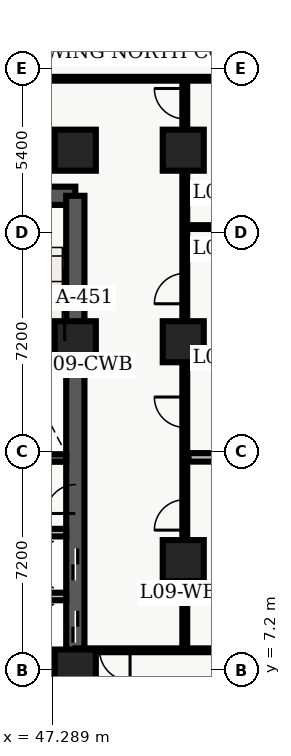
"""IFC4 building model, lengths in metres.
Left out: names, types, materials, properties, quantities, classifications, styles, units other than length and angle.
Written with IfcOpenShell. Run it as: python <this file> out.ifc"""

import sys

from ifc_helpers import new_model, entity, si_unit, converted_unit, direction, frame, origin_with_axes, origin_2d_with_axis, place, context, subcontext, project, spatial, polyline, rectangle, outline, extrude, element, fill, save


model = new_model("IFC4")
c1 = context("Model", 3, precision=1e-05, world=origin_with_axes(), true_north=direction((0.0, 1.0)))
c2 = subcontext(c1, "Body", "Model", "MODEL_VIEW")
j1 = project(units=[si_unit("LENGTHUNIT", "METRE"), converted_unit("PLANEANGLEUNIT", "DEGREE", entity("IfcPlaneAngleMeasure", 0.017), si_unit("PLANEANGLEUNIT", "RADIAN"), dimensions=[0, 0, 0, 0, 0, 0, 0])], contexts=[c1])
p1 = place(None, origin_with_axes())
s1 = spatial("IfcSite", under=j1, at=p1, CompositionType="ELEMENT")
p2 = place(p1, origin_with_axes())
s2 = spatial("IfcBuilding", under=s1, at=p2, CompositionType="ELEMENT")
p3 = place(p2, frame((0.0, 0.0, 40.5), z_axis=(0.0, 0.0, 1.0), x_axis=(1.0, 0.0, 0.0)))
s3 = spatial("IfcBuildingStorey", under=s2, at=p3, CompositionType="ELEMENT", Elevation=40.5)
p4 = place(p3, frame((40.2, 7.2, 0.0), z_axis=(0.0, 0.0, 1.0), x_axis=(1.0, 0.0, 0.0)))
e1 = element("IfcWall", 1, at=p4, inside=s3, PredefinedType="SHEAR", context=c2, shape_type="SweptSolid", body=[
    extrude(outline(polyline([(0.0, -0.3), (7.85, -0.3), (7.85, 0.3), (0.0, 0.3), (0.0, -0.3)])), origin_with_axes(), (0.0, 0.0, 1.0), 3.66),
])
p5 = place(p4, frame((2.175, 0.0, 0.0), z_axis=(0.0, 0.0, 1.0), x_axis=(1.0, 0.0, 0.0)))
e2 = element("IfcOpeningElement", 2, at=p5, cuts=e1, PredefinedType="OPENING", context=c2, shape_type="SweptSolid", body=[
    extrude(rectangle(XDim=1.05, YDim=0.62, at=origin_2d_with_axis()), origin_with_axes(), (0.0, 0.0, 1.0), 2.15),
])
p6 = place(p3, frame((40.2, 22.8, 0.0), z_axis=(0.0, 0.0, 1.0), x_axis=(1.0, 0.0, 0.0)))
e3 = element("IfcWall", 3, at=p6, inside=s3, PredefinedType="SHEAR", context=c2, shape_type="SweptSolid", body=[
    extrude(outline(polyline([(0.0, -0.3), (7.85, -0.3), (7.85, 0.3), (0.0, 0.3), (0.0, -0.3)])), origin_with_axes(), (0.0, 0.0, 1.0), 3.66),
])
p7 = place(p6, frame((5.775, 0.0, 0.0), z_axis=(0.0, 0.0, 1.0), x_axis=(1.0, 0.0, 0.0)))
e4 = element("IfcOpeningElement", 4, at=p7, cuts=e3, PredefinedType="OPENING", context=c2, shape_type="SweptSolid", body=[
    extrude(rectangle(XDim=1.05, YDim=0.62, at=origin_2d_with_axis()), origin_with_axes(), (0.0, 0.0, 1.0), 2.15),
])
p8 = place(p6, frame((2.15, 0.0, 0.0), z_axis=(0.0, 0.0, 1.0), x_axis=(1.0, 0.0, 0.0)))
e5 = element("IfcOpeningElement", 5, at=p8, cuts=e3, PredefinedType="OPENING", context=c2, shape_type="SweptSolid", body=[
    extrude(rectangle(XDim=0.9, YDim=0.62, at=origin_2d_with_axis()), origin_with_axes(), (0.0, 0.0, 1.0), 2.15),
])
p9 = place(p3, frame((48.05, 7.2, 0.0), z_axis=(0.0, 0.0, 1.0), x_axis=(0.0, 1.0, 0.0)))
e6 = element("IfcWall", 6, at=p9, inside=s3, PredefinedType="SHEAR", context=c2, shape_type="SweptSolid", body=[
    extrude(outline(polyline([(0.0, -0.3), (15.6, -0.3), (15.6, 0.3), (0.0, 0.3), (0.0, -0.3)])), origin_with_axes(), (0.0, 0.0, 1.0), 3.66),
])
p10 = place(p9, frame((1.425, 0.0, 0.0), z_axis=(0.0, 0.0, 1.0), x_axis=(1.0, 0.0, 0.0)))
e7 = element("IfcOpeningElement", 7, at=p10, cuts=e6, PredefinedType="OPENING", context=c2, shape_type="SweptSolid", body=[
    extrude(rectangle(XDim=1.05, YDim=0.62, at=origin_2d_with_axis()), origin_with_axes(), (0.0, 0.0, 1.0), 2.15),
])
p11 = place(p9, frame((3.475, 0.0, 0.0), z_axis=(0.0, 0.0, 1.0), x_axis=(1.0, 0.0, 0.0)))
e8 = element("IfcOpeningElement", 8, at=p11, cuts=e6, PredefinedType="OPENING", context=c2, shape_type="SweptSolid", body=[
    extrude(rectangle(XDim=1.05, YDim=0.62, at=origin_2d_with_axis()), origin_with_axes(), (0.0, 0.0, 1.0), 2.15),
])
p12 = place(p9, frame((5.625, 0.0, 0.0), z_axis=(0.0, 0.0, 1.0), x_axis=(1.0, 0.0, 0.0)))
e9 = element("IfcOpeningElement", 9, at=p12, cuts=e6, PredefinedType="OPENING", context=c2, shape_type="SweptSolid", body=[
    extrude(rectangle(XDim=0.95, YDim=0.62, at=origin_2d_with_axis()), origin_with_axes(), (0.0, 0.0, 1.0), 2.15),
])
p13 = place(p3, frame((44.25, 14.175, 0.0), z_axis=(0.0, 0.0, 1.0), x_axis=(1.0, 0.0, 0.0)))
e10 = element("IfcWall", 10, at=p13, inside=s3, PredefinedType="SHEAR", context=c2, shape_type="SweptSolid", body=[
    extrude(outline(polyline([(0.0, -0.125), (3.5, -0.125), (3.5, 0.125), (0.0, 0.125), (0.0, -0.125)])), origin_with_axes(), (0.0, 0.0, 1.0), 3.66),
])
for number, where, z_axis, x_axis in (
    (11, (48.05, 7.2, 0.0), (0.0, 0.0, 1.0), (1.0, 0.0, 0.0)),
    (12, (48.05, 18.0, 0.0), (0.0, 0.0, 1.0), (1.0, 0.0, 0.0)),
    (13, (48.05, 24.3, 0.0), (0.0, 0.0, 1.0), (1.0, 0.0, 0.0)),
    (14, (51.6, 10.8, 0.0), (0.0, 0.0, 1.0), (1.0, 0.0, 0.0)),
    (15, (51.6, 18.0, 0.0), (0.0, 0.0, 1.0), (1.0, 0.0, 0.0)),
    (16, (51.6, 24.3, 0.0), (0.0, 0.0, 1.0), (1.0, 0.0, 0.0)),
):
    element("IfcColumn", number, at=place(p3, frame(where, z_axis=z_axis, x_axis=x_axis)), inside=s3, PredefinedType="COLUMN", context=c2, shape_type="SweptSolid", body=[
        extrude(rectangle(XDim=1.35, YDim=1.35, at=origin_2d_with_axis()), origin_with_axes(), (0.0, 0.0, 1.0), 3.9),
    ])
for number, where, z_axis, x_axis in (
    (17, (44.25, 9.62, 0.0), (0.0, 0.0, 1.0), (1.0, 0.0, 0.0)),
    (18, (44.25, 11.72, 0.0), (0.0, 0.0, 1.0), (1.0, 0.0, 0.0)),
):
    element("IfcWall", number, at=place(p3, frame(where, z_axis=z_axis, x_axis=x_axis)), inside=s3, PredefinedType="SOLIDWALL", context=c2, shape_type="SweptSolid", body=[
        extrude(outline(polyline([(0.0, -0.125), (3.5, -0.125), (3.5, 0.125), (0.0, 0.125), (0.0, -0.125)])), origin_with_axes(), (0.0, 0.0, 1.0), 2.7),
    ])
p14 = place(p3, frame((51.65, 7.85, 0.0), z_axis=(0.0, 0.0, 1.0), x_axis=(0.0, 1.0, 0.0)))
e19 = element("IfcWall", 19, at=p14, inside=s3, PredefinedType="PARTITIONING", context=c2, shape_type="SweptSolid", body=[
    extrude(outline(polyline([(0.0, -0.08), (18.8, -0.08), (18.8, 0.08), (0.0, 0.08), (0.0, -0.08)])), origin_with_axes(), (0.0, 0.0, 1.0), 2.7),
])
p15 = place(p14, frame((4.453, 0.0, 0.0), z_axis=(0.0, 0.0, 1.0), x_axis=(1.0, 0.0, 0.0)))
e20 = element("IfcOpeningElement", 20, at=p15, cuts=e19, PredefinedType="OPENING", context=c2, shape_type="SweptSolid", body=[
    extrude(rectangle(XDim=1.0, YDim=0.18, at=origin_2d_with_axis()), origin_with_axes(), (0.0, 0.0, 1.0), 2.15),
])
p16 = place(p14, frame((7.831, 0.0, 0.0), z_axis=(0.0, 0.0, 1.0), x_axis=(1.0, 0.0, 0.0)))
e21 = element("IfcOpeningElement", 21, at=p16, cuts=e19, PredefinedType="OPENING", context=c2, shape_type="SweptSolid", body=[
    extrude(rectangle(XDim=1.0, YDim=0.18, at=origin_2d_with_axis()), origin_with_axes(), (0.0, 0.0, 1.0), 2.15),
])
p17 = place(p14, frame((11.898, 0.0, 0.0), z_axis=(0.0, 0.0, 1.0), x_axis=(1.0, 0.0, 0.0)))
e22 = element("IfcOpeningElement", 22, at=p17, cuts=e19, PredefinedType="OPENING", context=c2, shape_type="SweptSolid", body=[
    extrude(rectangle(XDim=1.0, YDim=0.18, at=origin_2d_with_axis()), origin_with_axes(), (0.0, 0.0, 1.0), 2.15),
])
p18 = place(p14, frame((17.98, 0.0, 0.0), z_axis=(0.0, 0.0, 1.0), x_axis=(1.0, 0.0, 0.0)))
e23 = element("IfcOpeningElement", 23, at=p18, cuts=e19, PredefinedType="OPENING", context=c2, shape_type="SweptSolid", body=[
    extrude(rectangle(XDim=1.0, YDim=0.18, at=origin_2d_with_axis()), origin_with_axes(), (0.0, 0.0, 1.0), 2.15),
])
p19 = place(p3, frame((59.64, 7.85, 0.0), z_axis=(0.0, 0.0, 1.0), x_axis=(-1.0, 0.0, 0.0)))
e24 = element("IfcWall", 24, at=p19, inside=s3, PredefinedType="PARTITIONING", context=c2, shape_type="SweptSolid", body=[
    extrude(outline(polyline([(0.0, -0.062), (11.59, -0.062), (11.59, 0.062), (0.0, 0.062), (0.0, -0.062)])), origin_with_axes(), (0.0, 0.0, 1.0), 2.7),
])
p20 = place(p19, frame((10.29, 0.0, 0.0), z_axis=(0.0, 0.0, 1.0), x_axis=(1.0, 0.0, 0.0)))
e25 = element("IfcOpeningElement", 25, at=p20, cuts=e24, PredefinedType="OPENING", context=c2, shape_type="SweptSolid", body=[
    extrude(rectangle(XDim=1.0, YDim=0.145, at=origin_2d_with_axis()), origin_with_axes(), (0.0, 0.0, 1.0), 2.15),
])
p21 = place(p3, frame((38.76, 26.65, 0.0), z_axis=(0.0, 0.0, 1.0), x_axis=(1.0, 0.0, 0.0)))
e26 = element("IfcWall", 26, at=p21, inside=s3, PredefinedType="PARTITIONING", context=c2, shape_type="SweptSolid", body=[
    extrude(outline(polyline([(0.0, -0.062), (20.88, -0.062), (20.88, 0.062), (0.0, 0.062), (0.0, -0.062)])), origin_with_axes(), (0.0, 0.0, 1.0), 2.7),
])
p22 = place(p21, frame((4.24, 0.0, 0.0), z_axis=(0.0, 0.0, 1.0), x_axis=(1.0, 0.0, 0.0)))
e27 = element("IfcOpeningElement", 27, at=p22, cuts=e26, PredefinedType="OPENING", context=c2, shape_type="SweptSolid", body=[
    extrude(rectangle(XDim=1.0, YDim=0.145, at=origin_2d_with_axis()), origin_with_axes(), (0.0, 0.0, 1.0), 2.15),
])
p23 = place(p3, frame((51.77, 14.196, 0.0), z_axis=(0.0, 0.0, 1.0), x_axis=(1.0, 0.0, 0.0)))
e28 = element("IfcWall", 28, at=p23, inside=s3, PredefinedType="PARTITIONING", context=c2, shape_type="SweptSolid", body=[
    extrude(outline(polyline([(0.0, -0.14), (7.855, -0.14), (7.855, 0.14), (0.0, 0.14), (0.0, -0.14)])), origin_with_axes(), (0.0, 0.0, 1.0), 2.7),
])
for number, where, z_axis, x_axis in (
    (29, (51.77, 17.725, 0.0), (0.0, 0.0, 1.0), (1.0, 0.0, 0.0)),
    (30, (51.77, 21.771, 0.0), (0.0, 0.0, 1.0), (1.0, 0.0, 0.0)),
):
    element("IfcWall", number, at=place(p3, frame(where, z_axis=z_axis, x_axis=x_axis)), inside=s3, PredefinedType="PARTITIONING", context=c2, shape_type="SweptSolid", body=[
        extrude(outline(polyline([(0.0, -0.062), (7.855, -0.062), (7.855, 0.062), (0.0, 0.062), (0.0, -0.062)])), origin_with_axes(), (0.0, 0.0, 1.0), 2.7),
    ])
p24 = place(p9, frame((1.425, 0.0, 0.0), z_axis=(0.0, 0.0, 1.0), x_axis=(1.0, 0.0, 0.0)))
e31 = element("IfcDoor", 31, at=p24, inside=s3, OperationType="SLIDING_TO_LEFT", PredefinedType="DOOR", context=c2, shape_type="SweptSolid", body=[
    extrude(rectangle(XDim=1.05, YDim=0.09, at=origin_2d_with_axis()), origin_with_axes(), (0.0, 0.0, 1.0), 2.15),
])
fill(e7, e31)
p25 = place(p9, frame((3.475, 0.0, 0.0), z_axis=(0.0, 0.0, 1.0), x_axis=(1.0, 0.0, 0.0)))
e32 = element("IfcDoor", 32, at=p25, inside=s3, OperationType="SLIDING_TO_RIGHT", PredefinedType="DOOR", context=c2, shape_type="SweptSolid", body=[
    extrude(rectangle(XDim=1.05, YDim=0.09, at=origin_2d_with_axis()), origin_with_axes(), (0.0, 0.0, 1.0), 2.15),
])
fill(e8, e32)
p26 = place(p9, frame((5.625, 0.0, 0.0), z_axis=(0.0, 0.0, 1.0), x_axis=(1.0, 0.0, 0.0)))
e33 = element("IfcDoor", 33, at=p26, inside=s3, OperationType="SINGLE_SWING_LEFT", PredefinedType="DOOR", context=c2, shape_type="SweptSolid", body=[
    extrude(rectangle(XDim=0.95, YDim=0.09, at=origin_2d_with_axis()), origin_with_axes(), (0.0, 0.0, 1.0), 2.15),
])
fill(e9, e33)
p27 = place(p19, frame((10.29, 0.0, 0.0), z_axis=(0.0, 0.0, 1.0), x_axis=(1.0, 0.0, 0.0)))
e34 = element("IfcDoor", 34, at=p27, inside=s3, OperationType="SINGLE_SWING_LEFT", PredefinedType="DOOR", context=c2, shape_type="SweptSolid", body=[
    extrude(rectangle(XDim=1.0, YDim=0.075, at=origin_2d_with_axis()), origin_with_axes(), (0.0, 0.0, 1.0), 2.15),
])
fill(e25, e34)
p28 = place(p14, frame((4.453, 0.0, 0.0), z_axis=(0.0, 0.0, 1.0), x_axis=(1.0, 0.0, 0.0)))
e35 = element("IfcDoor", 35, at=p28, inside=s3, OperationType="SINGLE_SWING_LEFT", PredefinedType="DOOR", context=c2, shape_type="SweptSolid", body=[
    extrude(rectangle(XDim=1.0, YDim=0.09, at=origin_2d_with_axis()), origin_with_axes(), (0.0, 0.0, 1.0), 2.15),
])
fill(e20, e35)
p29 = place(p14, frame((7.831, 0.0, 0.0), z_axis=(0.0, 0.0, 1.0), x_axis=(1.0, 0.0, 0.0)))
e36 = element("IfcDoor", 36, at=p29, inside=s3, OperationType="SINGLE_SWING_RIGHT", PredefinedType="DOOR", context=c2, shape_type="SweptSolid", body=[
    extrude(rectangle(XDim=1.0, YDim=0.09, at=origin_2d_with_axis()), origin_with_axes(), (0.0, 0.0, 1.0), 2.15),
])
fill(e21, e36)
p30 = place(p14, frame((11.898, 0.0, 0.0), z_axis=(0.0, 0.0, 1.0), x_axis=(1.0, 0.0, 0.0)))
e37 = element("IfcDoor", 37, at=p30, inside=s3, OperationType="SINGLE_SWING_LEFT", PredefinedType="DOOR", context=c2, shape_type="SweptSolid", body=[
    extrude(rectangle(XDim=1.0, YDim=0.09, at=origin_2d_with_axis()), origin_with_axes(), (0.0, 0.0, 1.0), 2.15),
])
fill(e22, e37)
p31 = place(p14, frame((17.98, 0.0, 0.0), z_axis=(0.0, 0.0, 1.0), x_axis=(1.0, 0.0, 0.0)))
e38 = element("IfcDoor", 38, at=p31, inside=s3, OperationType="SINGLE_SWING_RIGHT", PredefinedType="DOOR", context=c2, shape_type="SweptSolid", body=[
    extrude(rectangle(XDim=1.0, YDim=0.09, at=origin_2d_with_axis()), origin_with_axes(), (0.0, 0.0, 1.0), 2.15),
])
fill(e23, e38)
save(model, sys.argv[1])
